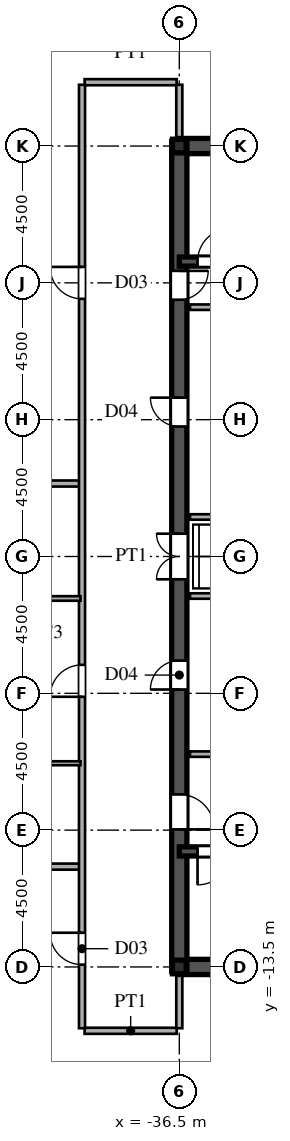
"""IFC4 building model, lengths in metres.
Left out: names, types, materials, properties, quantities, classifications, styles, units other than length and angle.
Written with IfcOpenShell. Run it as: python <this file> out.ifc"""

import sys

from ifc_helpers import new_model, si_unit, direction, frame, frame_2d, origin, origin_2d, place, context, subcontext, project, spatial, rectangle, i_section, extrude, source, transform, mapped, element, fill, save


model = new_model("IFC4")
c1 = context("Model", 3, precision=1e-05, world=origin(), true_north=direction((0.0, 1.0)))
c2 = subcontext(c1, "Body", "Model", "MODEL_VIEW")
j1 = project(units=[si_unit("LENGTHUNIT", "METRE"), si_unit("PLANEANGLEUNIT", "RADIAN")], contexts=[c1])
p1 = place(None, origin())
s1 = spatial("IfcSite", under=j1, at=p1, CompositionType="ELEMENT")
p2 = place(p1, origin())
s2 = spatial("IfcBuilding", under=s1, at=p2, CompositionType="ELEMENT")
p3 = place(p2, frame((0.0, 0.0, 246.9)))
s3 = spatial("IfcBuildingStorey", under=s2, at=p3, CompositionType="ELEMENT", Elevation=246.9)
m1 = source(origin(), c2, "Body", "SweptSolid", [
    extrude(i_section(OverallWidth=0.45, OverallDepth=0.45, WebThickness=0.016, FlangeThickness=0.025, at=origin_2d()), origin(), (0.0, 0.0, 1.0), 3.75),
])
for number, where, z_axis, x_axis in (
    (1, (-36.5, -13.5, 0.0), (0.0, 0.0, 1.0), (1.0, 0.0, 0.0)),
    (2, (-36.5, 13.5, 0.0), (0.0, 0.0, 1.0), (1.0, 0.0, 0.0)),
):
    element("IfcColumn", number, at=place(p3, frame(where, z_axis=z_axis, x_axis=x_axis)), inside=s3, PredefinedType="COLUMN", context=c2, shape_type="MappedRepresentation", body=[
        mapped(m1, transform((0.0, 0.0, 0.0), scale=1.0)),
    ])
for number, where, z_axis, x_axis in (
    (3, (-36.5, -13.5, 0.0), (0.0, 0.0, 1.0), (1.0, 0.0, 0.0)),
    (4, (-36.5, 13.5, 0.0), (0.0, 0.0, 1.0), (1.0, 0.0, 0.0)),
):
    element("IfcWall", number, at=place(p3, frame(where, z_axis=z_axis, x_axis=x_axis)), inside=s3, PredefinedType="SHEAR", context=c2, shape_type="SweptSolid", body=[
        extrude(rectangle(XDim=9.0, YDim=0.5, at=frame_2d((4.5, 0.0))), origin(), (0.0, 0.0, 1.0), 3.53),
    ])
p4 = place(p3, frame((-36.5, -13.65, 0.0), z_axis=(0.0, 0.0, 1.0), x_axis=(0.0, 1.0, 0.0)))
e5 = element("IfcWall", 5, at=p4, inside=s3, PredefinedType="SHEAR", context=c2, shape_type="SweptSolid", body=[
    extrude(rectangle(XDim=7.15, YDim=0.5, at=frame_2d((3.575, 0.0))), origin(), (0.0, 0.0, 1.0), 3.53),
])
p5 = place(p4, frame((4.675, 0.0, 0.0)))
e6 = element("IfcOpeningElement", 6, at=p5, cuts=e5, PredefinedType="OPENING", context=c2, shape_type="SweptSolid", body=[
    extrude(rectangle(XDim=1.15, YDim=2.2, at=frame_2d((0.575, 1.1))), frame((0.0, 0.26, 0.0), z_axis=(0.0, -1.0, 0.0), x_axis=(1.0, 0.0, 0.0)), (0.0, 0.0, 1.0), 0.52),
])
p6 = place(p3, frame((-36.5, -1.3, 0.0), z_axis=(0.0, 0.0, 1.0), x_axis=(0.0, 1.0, 0.0)))
e7 = element("IfcWall", 7, at=p6, inside=s3, PredefinedType="SHEAR", context=c2, shape_type="SweptSolid", body=[
    extrude(rectangle(XDim=2.6, YDim=0.5, at=frame_2d((1.3, 0.0))), origin(), (0.0, 0.0, 1.0), 3.53),
])
p7 = place(p6, frame((0.55, 0.0, 0.0)))
e8 = element("IfcOpeningElement", 8, at=p7, cuts=e7, PredefinedType="OPENING", context=c2, shape_type="SweptSolid", body=[
    extrude(rectangle(XDim=1.5, YDim=2.3, at=frame_2d((0.75, 1.15))), frame((0.0, 0.26, 0.0), z_axis=(0.0, -1.0, 0.0), x_axis=(1.0, 0.0, 0.0)), (0.0, 0.0, 1.0), 0.52),
])
p8 = place(p3, frame((-36.5, 8.2, 0.0), z_axis=(0.0, 0.0, 1.0), x_axis=(0.0, 1.0, 0.0)))
e9 = element("IfcWall", 9, at=p8, inside=s3, PredefinedType="SHEAR", context=c2, shape_type="SweptSolid", body=[
    extrude(rectangle(XDim=5.45, YDim=0.5, at=frame_2d((2.725, 0.0))), origin(), (0.0, 0.0, 1.0), 3.53),
])
p9 = place(p8, frame((0.245, 0.0, 0.0)))
e10 = element("IfcOpeningElement", 10, at=p9, cuts=e9, PredefinedType="OPENING", context=c2, shape_type="SweptSolid", body=[
    extrude(rectangle(XDim=0.95, YDim=2.15, at=frame_2d((0.475, 1.075))), frame((0.0, 0.26, 0.0), z_axis=(0.0, -1.0, 0.0), x_axis=(1.0, 0.0, 0.0)), (0.0, 0.0, 1.0), 0.52),
])
p10 = place(p3, frame((-36.5, -6.5, 0.0), z_axis=(0.0, 0.0, 1.0), x_axis=(0.0, 1.0, 0.0)))
e11 = element("IfcWall", 11, at=p10, inside=s3, PredefinedType="SHEAR", context=c2, shape_type="SweptSolid", body=[
    extrude(rectangle(XDim=5.2, YDim=0.5, at=frame_2d((2.6, 0.0))), origin(), (0.0, 0.0, 1.0), 3.53),
])
p11 = place(p10, frame((2.125, 0.0, 0.0)))
e12 = element("IfcOpeningElement", 12, at=p11, cuts=e11, PredefinedType="OPENING", context=c2, shape_type="SweptSolid", body=[
    extrude(rectangle(XDim=0.95, YDim=2.15, at=frame_2d((0.475, 1.075))), frame((0.0, 0.26, 0.0), z_axis=(0.0, -1.0, 0.0), x_axis=(1.0, 0.0, 0.0)), (0.0, 0.0, 1.0), 0.52),
])
p12 = place(p3, frame((-36.5, 1.3, 0.0), z_axis=(0.0, 0.0, 1.0), x_axis=(0.0, 1.0, 0.0)))
e13 = element("IfcWall", 13, at=p12, inside=s3, PredefinedType="SHEAR", context=c2, shape_type="SweptSolid", body=[
    extrude(rectangle(XDim=6.9, YDim=0.5, at=frame_2d((3.45, 0.0))), origin(), (0.0, 0.0, 1.0), 3.53),
])
p13 = place(p12, frame((2.975, 0.0, 0.0)))
e14 = element("IfcOpeningElement", 14, at=p13, cuts=e13, PredefinedType="OPENING", context=c2, shape_type="SweptSolid", body=[
    extrude(rectangle(XDim=0.95, YDim=2.15, at=frame_2d((0.475, 1.075))), frame((0.0, 0.26, 0.0), z_axis=(0.0, -1.0, 0.0), x_axis=(1.0, 0.0, 0.0)), (0.0, 0.0, 1.0), 0.52),
])
p14 = place(p3, frame((-36.5, -9.7, 0.0), z_axis=(0.0, 0.0, 1.0), x_axis=(1.0, 0.0, 0.0)))
e15 = element("IfcWall", 15, at=p14, inside=s3, PredefinedType="SHEAR", context=c2, shape_type="SweptSolid", body=[
    extrude(rectangle(XDim=9.0, YDim=0.3, at=frame_2d((4.5, 0.0))), origin(), (0.0, 0.0, 1.0), 3.53),
])
p15 = place(p14, frame((0.6, 0.0, 0.0)))
e16 = element("IfcOpeningElement", 16, at=p15, cuts=e15, PredefinedType="OPENING", context=c2, shape_type="SweptSolid", body=[
    extrude(rectangle(XDim=1.1, YDim=2.2, at=frame_2d((0.55, 1.1))), frame((0.0, 0.16, 0.0), z_axis=(0.0, -1.0, 0.0), x_axis=(1.0, 0.0, 0.0)), (0.0, 0.0, 1.0), 0.32),
])
p16 = place(p3, frame((-36.5, 9.7, 0.0), z_axis=(0.0, 0.0, 1.0), x_axis=(1.0, 0.0, 0.0)))
e17 = element("IfcWall", 17, at=p16, inside=s3, PredefinedType="SHEAR", context=c2, shape_type="SweptSolid", body=[
    extrude(rectangle(XDim=9.0, YDim=0.3, at=frame_2d((4.5, 0.0))), origin(), (0.0, 0.0, 1.0), 3.53),
])
p17 = place(p16, frame((0.6, 0.0, 0.0)))
e18 = element("IfcOpeningElement", 18, at=p17, cuts=e17, PredefinedType="OPENING", context=c2, shape_type="SweptSolid", body=[
    extrude(rectangle(XDim=1.1, YDim=2.2, at=frame_2d((0.55, 1.1))), frame((0.0, 0.16, 0.0), z_axis=(0.0, -1.0, 0.0), x_axis=(1.0, 0.0, 0.0)), (0.0, 0.0, 1.0), 0.32),
])
for number, where, z_axis, x_axis in (
    (19, (-36.15, -6.5, 0.0), (0.0, 0.0, 1.0), (1.0, 0.0, 0.0)),
    (20, (-36.15, 8.2, 0.0), (0.0, 0.0, 1.0), (1.0, 0.0, 0.0)),
):
    element("IfcWall", number, at=place(p3, frame(where, z_axis=z_axis, x_axis=x_axis)), inside=s3, PredefinedType="PARTITIONING", context=c2, shape_type="SweptSolid", body=[
        extrude(rectangle(XDim=5.7, YDim=0.18, at=frame_2d((2.85, 0.0))), origin(), (0.0, 0.0, 1.0), 3.53),
    ])
for number, where, z_axis, x_axis in (
    (21, (-36.15, -1.3, 0.0), (0.0, 0.0, 1.0), (1.0, 0.0, 0.0)),
    (22, (-36.15, 1.3, 0.0), (0.0, 0.0, 1.0), (1.0, 0.0, 0.0)),
):
    element("IfcWall", number, at=place(p3, frame(where, z_axis=z_axis, x_axis=x_axis)), inside=s3, PredefinedType="PARTITIONING", context=c2, shape_type="SweptSolid", body=[
        extrude(rectangle(XDim=2.95, YDim=0.18, at=frame_2d((1.475, 0.0))), origin(), (0.0, 0.0, 1.0), 3.53),
    ])
p18 = place(p3, frame((-39.615, -15.6, 0.0), z_axis=(0.0, 0.0, 1.0), x_axis=(1.0, 0.0, 0.0)))
e23 = element("IfcWall", 23, at=p18, inside=s3, PredefinedType="PARTITIONING", context=c2, shape_type="SweptSolid", body=[
    extrude(rectangle(XDim=3.03, YDim=0.2, at=frame_2d((1.515, 0.0))), origin(), (0.0, 0.0, 1.0), 3.53),
])
p19 = place(p3, frame((-53.01, -10.2, 0.0), z_axis=(0.0, 0.0, 1.0), x_axis=(1.0, 0.0, 0.0)))
e24 = element("IfcWall", 24, at=p19, inside=s3, PredefinedType="PARTITIONING", context=c2, shape_type="SweptSolid", body=[
    extrude(rectangle(XDim=13.23, YDim=0.2, at=frame_2d((6.615, 0.0))), origin(), (0.0, 0.0, 1.0), 3.53),
])
p20 = place(p3, frame((-44.25, -6.8, 0.0), z_axis=(0.0, 0.0, 1.0), x_axis=(1.0, 0.0, 0.0)))
e25 = element("IfcWall", 25, at=p20, inside=s3, PredefinedType="PARTITIONING", context=c2, shape_type="SweptSolid", body=[
    extrude(rectangle(XDim=4.5, YDim=0.13, at=frame_2d((2.25, 0.0))), origin(), (0.0, 0.0, 1.0), 3.53),
])
p21 = place(p20, frame((1.81, 0.0, 0.0)))
e26 = element("IfcOpeningElement", 26, at=p21, cuts=e25, PredefinedType="OPENING", context=c2, shape_type="SweptSolid", body=[
    extrude(rectangle(XDim=0.88, YDim=2.1, at=frame_2d((0.44, 1.05))), frame((0.0, 0.075, 0.0), z_axis=(0.0, -1.0, 0.0), x_axis=(1.0, 0.0, 0.0)), (0.0, 0.0, 1.0), 0.15),
])
p22 = place(p3, frame((-44.25, -1.38, 0.0), z_axis=(0.0, 0.0, 1.0), x_axis=(1.0, 0.0, 0.0)))
e27 = element("IfcWall", 27, at=p22, inside=s3, PredefinedType="PARTITIONING", context=c2, shape_type="SweptSolid", body=[
    extrude(rectangle(XDim=4.5, YDim=0.15, at=frame_2d((2.25, 0.0))), origin(), (0.0, 0.0, 1.0), 3.53),
])
p23 = place(p22, frame((1.775, 0.0, 0.0)))
e28 = element("IfcOpeningElement", 28, at=p23, cuts=e27, PredefinedType="OPENING", context=c2, shape_type="SweptSolid", body=[
    extrude(rectangle(XDim=0.95, YDim=2.15, at=frame_2d((0.475, 1.075))), frame((0.0, 0.085, 0.0), z_axis=(0.0, -1.0, 0.0), x_axis=(1.0, 0.0, 0.0)), (0.0, 0.0, 1.0), 0.17),
])
p24 = place(p3, frame((-66.01, 2.4, 0.0), z_axis=(0.0, 0.0, 1.0), x_axis=(1.0, 0.0, 0.0)))
e29 = element("IfcWall", 29, at=p24, inside=s3, PredefinedType="PARTITIONING", context=c2, shape_type="SweptSolid", body=[
    extrude(rectangle(XDim=26.23, YDim=0.2, at=frame_2d((13.115, 0.0))), origin(), (0.0, 0.0, 1.0), 3.53),
])
p25 = place(p3, frame((-39.615, 15.6, 0.0), z_axis=(0.0, 0.0, 1.0), x_axis=(1.0, 0.0, 0.0)))
e30 = element("IfcWall", 30, at=p25, inside=s3, PredefinedType="PARTITIONING", context=c2, shape_type="SweptSolid", body=[
    extrude(rectangle(XDim=3.03, YDim=0.2, at=frame_2d((1.515, 0.0))), origin(), (0.0, 0.0, 1.0), 3.53),
])
p26 = place(p3, frame((-39.7, -15.515, 0.0), z_axis=(0.0, 0.0, 1.0), x_axis=(0.0, 1.0, 0.0)))
e31 = element("IfcWall", 31, at=p26, inside=s3, PredefinedType="PARTITIONING", context=c2, shape_type="SweptSolid", body=[
    extrude(rectangle(XDim=31.03, YDim=0.2, at=frame_2d((15.515, 0.0))), origin(), (0.0, 0.0, 1.0), 3.53),
])
p27 = place(p26, frame((2.09, 0.0, 0.0)))
e32 = element("IfcOpeningElement", 32, at=p27, cuts=e31, PredefinedType="OPENING", context=c2, shape_type="SweptSolid", body=[
    extrude(rectangle(XDim=1.05, YDim=2.25, at=frame_2d((0.525, 1.125))), frame((0.0, 0.11, 0.0), z_axis=(0.0, -1.0, 0.0), x_axis=(1.0, 0.0, 0.0)), (0.0, 0.0, 1.0), 0.22),
])
p28 = place(p26, frame((10.901, 0.0, 0.0)))
e33 = element("IfcOpeningElement", 33, at=p28, cuts=e31, PredefinedType="OPENING", context=c2, shape_type="SweptSolid", body=[
    extrude(rectangle(XDim=1.05, YDim=2.25, at=frame_2d((0.525, 1.125))), frame((0.0, 0.11, 0.0), z_axis=(0.0, -1.0, 0.0), x_axis=(1.0, 0.0, 0.0)), (0.0, 0.0, 1.0), 0.22),
])
p29 = place(p26, frame((23.99, 0.0, 0.0)))
e34 = element("IfcOpeningElement", 34, at=p29, cuts=e31, PredefinedType="OPENING", context=c2, shape_type="SweptSolid", body=[
    extrude(rectangle(XDim=1.05, YDim=2.25, at=frame_2d((0.525, 1.125))), frame((0.0, 0.11, 0.0), z_axis=(0.0, -1.0, 0.0), x_axis=(1.0, 0.0, 0.0)), (0.0, 0.0, 1.0), 0.22),
])
for number, where, z_axis, x_axis in (
    (35, (-36.5, -15.515, 0.0), (0.0, 0.0, 1.0), (0.0, 1.0, 0.0)),
    (36, (-36.5, 13.755, 0.0), (0.0, 0.0, 1.0), (0.0, 1.0, 0.0)),
):
    element("IfcWall", number, at=place(p3, frame(where, z_axis=z_axis, x_axis=x_axis)), inside=s3, PredefinedType="PARTITIONING", context=c2, shape_type="SweptSolid", body=[
        extrude(rectangle(XDim=1.76, YDim=0.2, at=frame_2d((0.88, 0.0))), origin(), (0.0, 0.0, 1.0), 2.93),
    ])
m2 = source(origin(), c2, "Body", "SweptSolid", [
    extrude(rectangle(XDim=1.15, YDim=2.2, at=frame_2d((0.575, 1.1))), frame((0.0, 0.025, 0.0), z_axis=(0.0, -1.0, 0.0), x_axis=(1.0, 0.0, 0.0)), (0.0, 0.0, 1.0), 0.05),
])
p30 = place(p5, frame((1.15, 0.0, 0.0), z_axis=(0.0, 0.0, 1.0), x_axis=(-1.0, 0.0, 0.0)))
e37 = element("IfcDoor", 37, at=p30, inside=s3, OperationType="SINGLE_SWING_LEFT", PredefinedType="DOOR", context=c2, shape_type="MappedRepresentation", body=[
    mapped(m2, transform((0.0, 0.0, 0.0), scale=1.0)),
])
fill(e6, e37)
m3 = source(origin(), c2, "Body", "SweptSolid", [
    extrude(rectangle(XDim=1.5, YDim=2.3, at=frame_2d((0.75, 1.15))), frame((0.0, 0.025, 0.0), z_axis=(0.0, -1.0, 0.0), x_axis=(1.0, 0.0, 0.0)), (0.0, 0.0, 1.0), 0.05),
])
p31 = place(p7, origin())
e38 = element("IfcDoor", 38, at=p31, inside=s3, OperationType="DOUBLE_SWING_LEFT", PredefinedType="DOOR", context=c2, shape_type="MappedRepresentation", body=[
    mapped(m3, transform((0.0, 0.0, 0.0), scale=1.0)),
])
fill(e8, e38)
m4 = source(origin(), c2, "Body", "SweptSolid", [
    extrude(rectangle(XDim=0.95, YDim=2.15, at=frame_2d((0.475, 1.075))), frame((0.0, 0.025, 0.0), z_axis=(0.0, -1.0, 0.0), x_axis=(1.0, 0.0, 0.0)), (0.0, 0.0, 1.0), 0.05),
])
p32 = place(p9, frame((0.95, 0.0, 0.0), z_axis=(0.0, 0.0, 1.0), x_axis=(-1.0, 0.0, 0.0)))
e39 = element("IfcDoor", 39, at=p32, inside=s3, OperationType="SINGLE_SWING_RIGHT", PredefinedType="DOOR", context=c2, shape_type="MappedRepresentation", body=[
    mapped(m4, transform((0.0, 0.0, 0.0), scale=1.0)),
])
fill(e10, e39)
p33 = place(p11, origin())
e40 = element("IfcDoor", 40, at=p33, inside=s3, OperationType="SINGLE_SWING_LEFT", PredefinedType="DOOR", context=c2, shape_type="MappedRepresentation", body=[
    mapped(m4, transform((0.0, 0.0, 0.0), scale=1.0)),
])
fill(e12, e40)
p34 = place(p13, origin())
e41 = element("IfcDoor", 41, at=p34, inside=s3, OperationType="SINGLE_SWING_RIGHT", PredefinedType="DOOR", context=c2, shape_type="MappedRepresentation", body=[
    mapped(m4, transform((0.0, 0.0, 0.0), scale=1.0)),
])
fill(e14, e41)
m5 = source(origin(), c2, "Body", "SweptSolid", [
    extrude(rectangle(XDim=1.1, YDim=2.2, at=frame_2d((0.55, 1.1))), frame((0.0, 0.025, 0.0), z_axis=(0.0, -1.0, 0.0), x_axis=(1.0, 0.0, 0.0)), (0.0, 0.0, 1.0), 0.05),
])
p35 = place(p15, frame((1.1, 0.0, 0.0), z_axis=(0.0, 0.0, 1.0), x_axis=(-1.0, 0.0, 0.0)))
e42 = element("IfcDoor", 42, at=p35, inside=s3, OperationType="SINGLE_SWING_LEFT", PredefinedType="DOOR", context=c2, shape_type="MappedRepresentation", body=[
    mapped(m5, transform((0.0, 0.0, 0.0), scale=1.0)),
])
fill(e16, e42)
p36 = place(p17, origin())
e43 = element("IfcDoor", 43, at=p36, inside=s3, OperationType="SINGLE_SWING_RIGHT", PredefinedType="DOOR", context=c2, shape_type="MappedRepresentation", body=[
    mapped(m5, transform((0.0, 0.0, 0.0), scale=1.0)),
])
fill(e18, e43)
m6 = source(origin(), c2, "Body", "SweptSolid", [
    extrude(rectangle(XDim=1.05, YDim=2.25, at=frame_2d((0.525, 1.125))), frame((0.0, 0.025, 0.0), z_axis=(0.0, -1.0, 0.0), x_axis=(1.0, 0.0, 0.0)), (0.0, 0.0, 1.0), 0.05),
])
p37 = place(p27, origin())
e44 = element("IfcDoor", 44, at=p37, inside=s3, OperationType="SINGLE_SWING_RIGHT", PredefinedType="DOOR", context=c2, shape_type="MappedRepresentation", body=[
    mapped(m6, transform((0.0, 0.0, 0.0), scale=1.0)),
])
fill(e32, e44)
p38 = place(p28, origin())
e45 = element("IfcDoor", 45, at=p38, inside=s3, OperationType="SINGLE_SWING_LEFT", PredefinedType="DOOR", context=c2, shape_type="MappedRepresentation", body=[
    mapped(m6, transform((0.0, 0.0, 0.0), scale=1.0)),
])
fill(e33, e45)
p39 = place(p29, origin())
e46 = element("IfcDoor", 46, at=p39, inside=s3, OperationType="SINGLE_SWING_RIGHT", PredefinedType="DOOR", context=c2, shape_type="MappedRepresentation", body=[
    mapped(m6, transform((0.0, 0.0, 0.0), scale=1.0)),
])
fill(e34, e46)
save(model, sys.argv[1])
